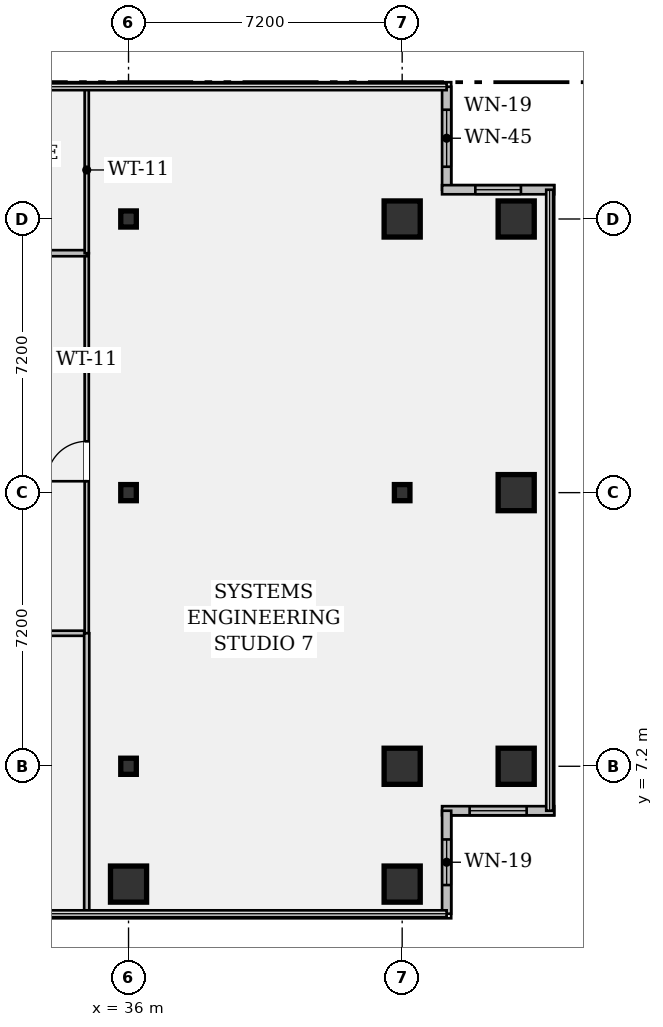
"""IFC4 building model, lengths in metres.
Left out: names, types, materials, properties, quantities, classifications, styles, units other than length and angle.
Written with IfcOpenShell. Run it as: python <this file> out.ifc"""

import sys

from ifc_helpers import new_model, si_unit, direction, frame, frame_2d, origin, origin_2d, place, context, subcontext, project, spatial, rectangle, hollow_rectangle, i_section, extrude, element, fill, save


model = new_model("IFC4")
c1 = context("Model", 3, precision=1e-05, world=origin(), true_north=direction((0.0, 1.0)))
c2 = subcontext(c1, "Body", "Model", "MODEL_VIEW")
j1 = project(units=[si_unit("LENGTHUNIT", "METRE"), si_unit("PLANEANGLEUNIT", "RADIAN")], contexts=[c1])
p1 = place(None, origin())
s1 = spatial("IfcSite", under=j1, at=p1, CompositionType="ELEMENT")
p2 = place(p1, origin())
s2 = spatial("IfcBuilding", under=s1, at=p2, CompositionType="ELEMENT")
p3 = place(p2, frame((0.0, 0.0, 113.75)))
s3 = spatial("IfcBuildingStorey", under=s2, at=p3, CompositionType="ELEMENT", Elevation=113.75)
p4 = place(p3, frame((36.0, 4.1, 0.0), z_axis=(0.0, 0.0, 1.0), x_axis=(1.0, 0.0, 0.0)))
e1 = element("IfcColumn", 1, at=p4, inside=s3, PredefinedType="COLUMN", context=c2, shape_type="SweptSolid", body=[
    extrude(hollow_rectangle(XDim=0.95, YDim=0.95, WallThickness=0.06, at=origin_2d()), origin(), (0.0, 0.0, 1.0), 3.58),
])
for number, where, z_axis, x_axis in (
    (2, (36.0, 7.2, 0.0), (0.0, 0.0, 1.0), (1.0, 0.0, 0.0)),
    (3, (36.0, 14.4, 0.0), (0.0, 0.0, 1.0), (1.0, 0.0, 0.0)),
    (4, (36.0, 21.6, 0.0), (0.0, 0.0, 1.0), (1.0, 0.0, 0.0)),
):
    element("IfcColumn", number, at=place(p3, frame(where, z_axis=z_axis, x_axis=x_axis)), inside=s3, PredefinedType="COLUMN", context=c2, shape_type="SweptSolid", body=[
        extrude(i_section(OverallWidth=0.409, OverallDepth=0.424, WebThickness=0.033, FlangeThickness=0.052, FilletRadius=0.018, at=origin_2d()), origin(), (0.0, 0.0, 1.0), 3.58),
    ])
for number, where, z_axis, x_axis in (
    (5, (43.2, 4.1, 0.0), (0.0, 0.0, 1.0), (1.0, 0.0, 0.0)),
    (6, (43.2, 7.2, 0.0), (0.0, 0.0, 1.0), (1.0, 0.0, 0.0)),
):
    element("IfcColumn", number, at=place(p3, frame(where, z_axis=z_axis, x_axis=x_axis)), inside=s3, PredefinedType="COLUMN", context=c2, shape_type="SweptSolid", body=[
        extrude(hollow_rectangle(XDim=0.95, YDim=0.95, WallThickness=0.06, at=origin_2d()), origin(), (0.0, 0.0, 1.0), 3.58),
    ])
p5 = place(p3, frame((43.2, 14.4, 0.0), z_axis=(0.0, 0.0, 1.0), x_axis=(1.0, 0.0, 0.0)))
e7 = element("IfcColumn", 7, at=p5, inside=s3, PredefinedType="COLUMN", context=c2, shape_type="SweptSolid", body=[
    extrude(i_section(OverallWidth=0.409, OverallDepth=0.424, WebThickness=0.033, FlangeThickness=0.052, FilletRadius=0.018, at=origin_2d()), origin(), (0.0, 0.0, 1.0), 3.58),
])
for number, where, z_axis, x_axis in (
    (8, (43.2, 21.6, 0.0), (0.0, 0.0, 1.0), (1.0, 0.0, 0.0)),
    (9, (46.2, 7.2, 0.0), (0.0, 0.0, 1.0), (1.0, 0.0, 0.0)),
    (10, (46.2, 14.4, 0.0), (0.0, 0.0, 1.0), (1.0, 0.0, 0.0)),
    (11, (46.2, 21.6, 0.0), (0.0, 0.0, 1.0), (1.0, 0.0, 0.0)),
):
    element("IfcColumn", number, at=place(p3, frame(where, z_axis=z_axis, x_axis=x_axis)), inside=s3, PredefinedType="COLUMN", context=c2, shape_type="SweptSolid", body=[
        extrude(hollow_rectangle(XDim=0.95, YDim=0.95, WallThickness=0.06, at=origin_2d()), origin(), (0.0, 0.0, 1.0), 3.58),
    ])
p6 = place(p3, frame((44.37, 25.08, 0.0), z_axis=(0.0, 0.0, 1.0), x_axis=(0.0, -1.0, 0.0)))
e12 = element("IfcWall", 12, at=p6, inside=s3, PredefinedType="STANDARD", context=c2, shape_type="SweptSolid", body=[
    extrude(rectangle(XDim=2.71, YDim=0.24, at=frame_2d((1.355, 0.0))), origin(), (0.0, 0.0, 1.0), 3.58),
])
p7 = place(p6, frame((0.605, 0.0, 0.95)))
e13 = element("IfcOpeningElement", 13, at=p7, cuts=e12, PredefinedType="OPENING", context=c2, shape_type="SweptSolid", body=[
    extrude(rectangle(XDim=1.5, YDim=1.8, at=frame_2d((0.75, 0.9))), frame((0.0, 0.132, 0.0), z_axis=(0.0, -1.0, 0.0), x_axis=(1.0, 0.0, 0.0)), (0.0, 0.0, 1.0), 0.264),
])
p8 = place(p3, frame((44.25, 22.37, 0.0), z_axis=(0.0, 0.0, 1.0), x_axis=(1.0, 0.0, 0.0)))
e14 = element("IfcWall", 14, at=p8, inside=s3, PredefinedType="STANDARD", context=c2, shape_type="SweptSolid", body=[
    extrude(rectangle(XDim=2.95, YDim=0.24, at=frame_2d((1.475, 0.0))), origin(), (0.0, 0.0, 1.0), 3.58),
])
p9 = place(p8, frame((0.875, 0.0, 0.95)))
e15 = element("IfcOpeningElement", 15, at=p9, cuts=e14, PredefinedType="OPENING", context=c2, shape_type="SweptSolid", body=[
    extrude(rectangle(XDim=1.2, YDim=1.8, at=frame_2d((0.6, 0.9))), frame((0.0, 0.132, 0.0), z_axis=(0.0, -1.0, 0.0), x_axis=(1.0, 0.0, 0.0)), (0.0, 0.0, 1.0), 0.264),
])
p10 = place(p3, frame((47.2, 6.03, 0.0), z_axis=(0.0, 0.0, 1.0), x_axis=(-1.0, 0.0, 0.0)))
e16 = element("IfcWall", 16, at=p10, inside=s3, PredefinedType="STANDARD", context=c2, shape_type="SweptSolid", body=[
    extrude(rectangle(XDim=2.95, YDim=0.24, at=frame_2d((1.475, 0.0))), origin(), (0.0, 0.0, 1.0), 3.58),
])
p11 = place(p10, frame((0.725, 0.0, 0.95)))
e17 = element("IfcOpeningElement", 17, at=p11, cuts=e16, PredefinedType="OPENING", context=c2, shape_type="SweptSolid", body=[
    extrude(rectangle(XDim=1.5, YDim=1.8, at=frame_2d((0.75, 0.9))), frame((0.0, 0.132, 0.0), z_axis=(0.0, -1.0, 0.0), x_axis=(1.0, 0.0, 0.0)), (0.0, 0.0, 1.0), 0.264),
])
p12 = place(p3, frame((44.37, 6.03, 0.0), z_axis=(0.0, 0.0, 1.0), x_axis=(0.0, -1.0, 0.0)))
e18 = element("IfcWall", 18, at=p12, inside=s3, PredefinedType="STANDARD", context=c2, shape_type="SweptSolid", body=[
    extrude(rectangle(XDim=2.71, YDim=0.24, at=frame_2d((1.355, 0.0))), origin(), (0.0, 0.0, 1.0), 3.58),
])
p13 = place(p12, frame((0.755, 0.0, 0.95)))
e19 = element("IfcOpeningElement", 19, at=p13, cuts=e18, PredefinedType="OPENING", context=c2, shape_type="SweptSolid", body=[
    extrude(rectangle(XDim=1.2, YDim=1.8, at=frame_2d((0.6, 0.9))), frame((0.0, 0.132, 0.0), z_axis=(0.0, -1.0, 0.0), x_axis=(1.0, 0.0, 0.0)), (0.0, 0.0, 1.0), 0.264),
])
p14 = place(p3, frame((17.35, 10.7, 0.0), z_axis=(0.0, 0.0, 1.0), x_axis=(1.0, 0.0, 0.0)))
e20 = element("IfcWall", 20, at=p14, inside=s3, PredefinedType="PARTITIONING", context=c2, shape_type="SweptSolid", body=[
    extrude(rectangle(XDim=17.55, YDim=0.135, at=frame_2d((8.775, 0.0))), origin(), (0.0, 0.0, 1.0), 2.869),
])
p15 = place(p14, frame((2.82, 0.0, 0.0)))
e21 = element("IfcOpeningElement", 21, at=p15, cuts=e20, PredefinedType="OPENING", context=c2, shape_type="SweptSolid", body=[
    extrude(rectangle(XDim=0.98, YDim=2.15, at=frame_2d((0.49, 1.075))), frame((0.0, 0.08, 0.0), z_axis=(0.0, -1.0, 0.0), x_axis=(1.0, 0.0, 0.0)), (0.0, 0.0, 1.0), 0.159),
])
p16 = place(p14, frame((9.45, 0.0, 0.0)))
e22 = element("IfcOpeningElement", 22, at=p16, cuts=e20, PredefinedType="OPENING", context=c2, shape_type="SweptSolid", body=[
    extrude(rectangle(XDim=0.98, YDim=2.15, at=frame_2d((0.49, 1.075))), frame((0.0, 0.08, 0.0), z_axis=(0.0, -1.0, 0.0), x_axis=(1.0, 0.0, 0.0)), (0.0, 0.0, 1.0), 0.159),
])
p17 = place(p14, frame((14.9, 0.0, 0.0)))
e23 = element("IfcOpeningElement", 23, at=p17, cuts=e20, PredefinedType="OPENING", context=c2, shape_type="SweptSolid", body=[
    extrude(rectangle(XDim=0.98, YDim=2.15, at=frame_2d((0.49, 1.075))), frame((0.0, 0.08, 0.0), z_axis=(0.0, -1.0, 0.0), x_axis=(1.0, 0.0, 0.0)), (0.0, 0.0, 1.0), 0.159),
])
p18 = place(p3, frame((34.9, 10.7, 0.0), z_axis=(0.0, 0.0, 1.0), x_axis=(0.0, 1.0, 0.0)))
e24 = element("IfcWall", 24, at=p18, inside=s3, PredefinedType="PARTITIONING", context=c2, shape_type="SweptSolid", body=[
    extrude(rectangle(XDim=10.0, YDim=0.11, at=frame_2d((5.0, 0.0))), origin(), (0.0, 0.0, 1.0), 2.869),
])
p19 = place(p18, frame((4.0, 0.0, 0.0)))
e25 = element("IfcOpeningElement", 25, at=p19, cuts=e24, PredefinedType="OPENING", context=c2, shape_type="SweptSolid", body=[
    extrude(rectangle(XDim=1.05, YDim=2.15, at=frame_2d((0.525, 1.075))), frame((0.0, 0.067, 0.0), z_axis=(0.0, -1.0, 0.0), x_axis=(1.0, 0.0, 0.0)), (0.0, 0.0, 1.0), 0.134),
])
p20 = place(p3, frame((17.35, 20.7, 0.0), z_axis=(0.0, 0.0, 1.0), x_axis=(1.0, 0.0, 0.0)))
e26 = element("IfcWall", 26, at=p20, inside=s3, PredefinedType="PARTITIONING", context=c2, shape_type="SweptSolid", body=[
    extrude(rectangle(XDim=17.55, YDim=0.16, at=frame_2d((8.775, 0.0))), origin(), (0.0, 0.0, 1.0), 2.869),
])
p21 = place(p20, frame((0.85, 0.0, 0.0)))
e27 = element("IfcOpeningElement", 27, at=p21, cuts=e26, PredefinedType="OPENING", context=c2, shape_type="SweptSolid", body=[
    extrude(rectangle(XDim=0.85, YDim=2.15, at=frame_2d((0.425, 1.075))), frame((0.0, 0.092, 0.0), z_axis=(0.0, -1.0, 0.0), x_axis=(1.0, 0.0, 0.0)), (0.0, 0.0, 1.0), 0.184),
])
p22 = place(p20, frame((4.75, 0.0, 0.0)))
e28 = element("IfcOpeningElement", 28, at=p22, cuts=e26, PredefinedType="OPENING", context=c2, shape_type="SweptSolid", body=[
    extrude(rectangle(XDim=0.85, YDim=2.15, at=frame_2d((0.425, 1.075))), frame((0.0, 0.092, 0.0), z_axis=(0.0, -1.0, 0.0), x_axis=(1.0, 0.0, 0.0)), (0.0, 0.0, 1.0), 0.184),
])
p23 = place(p20, frame((6.81, 0.0, 0.0)))
e29 = element("IfcOpeningElement", 29, at=p23, cuts=e26, PredefinedType="OPENING", context=c2, shape_type="SweptSolid", body=[
    extrude(rectangle(XDim=0.85, YDim=2.15, at=frame_2d((0.425, 1.075))), frame((0.0, 0.092, 0.0), z_axis=(0.0, -1.0, 0.0), x_axis=(1.0, 0.0, 0.0)), (0.0, 0.0, 1.0), 0.184),
])
p24 = place(p20, frame((9.21, 0.0, 0.0)))
e30 = element("IfcOpeningElement", 30, at=p24, cuts=e26, PredefinedType="OPENING", context=c2, shape_type="SweptSolid", body=[
    extrude(rectangle(XDim=0.98, YDim=2.15, at=frame_2d((0.49, 1.075))), frame((0.0, 0.092, 0.0), z_axis=(0.0, -1.0, 0.0), x_axis=(1.0, 0.0, 0.0)), (0.0, 0.0, 1.0), 0.184),
])
p25 = place(p3, frame((34.9, 3.32, 0.0), z_axis=(0.0, 0.0, 1.0), x_axis=(0.0, 1.0, 0.0)))
e31 = element("IfcWall", 31, at=p25, inside=s3, PredefinedType="PARTITIONING", context=c2, shape_type="SweptSolid", body=[
    extrude(rectangle(XDim=7.38, YDim=0.135, at=frame_2d((3.69, 0.0))), origin(), (0.0, 0.0, 1.0), 2.869),
])
p26 = place(p3, frame((34.9, 20.7, 0.0), z_axis=(0.0, 0.0, 1.0), x_axis=(0.0, 1.0, 0.0)))
e32 = element("IfcWall", 32, at=p26, inside=s3, PredefinedType="PARTITIONING", context=c2, shape_type="SweptSolid", body=[
    extrude(rectangle(XDim=4.38, YDim=0.11, at=frame_2d((2.19, 0.0))), origin(), (0.0, 0.0, 1.0), 2.869),
])
p27 = place(p7, origin())
e33 = element("IfcWindow", 33, at=p27, inside=s3, PartitioningType="SINGLE_PANEL", PredefinedType="WINDOW", context=c2, shape_type="SweptSolid", body=[
    extrude(rectangle(XDim=1.5, YDim=1.8, at=frame_2d((0.75, 0.9))), frame((0.0, 0.03, 0.0), z_axis=(0.0, -1.0, 0.0), x_axis=(1.0, 0.0, 0.0)), (0.0, 0.0, 1.0), 0.06),
])
fill(e13, e33)
p28 = place(p9, origin())
e34 = element("IfcWindow", 34, at=p28, inside=s3, PartitioningType="SINGLE_PANEL", PredefinedType="WINDOW", context=c2, shape_type="SweptSolid", body=[
    extrude(rectangle(XDim=1.2, YDim=1.8, at=frame_2d((0.6, 0.9))), frame((0.0, 0.03, 0.0), z_axis=(0.0, -1.0, 0.0), x_axis=(1.0, 0.0, 0.0)), (0.0, 0.0, 1.0), 0.06),
])
fill(e15, e34)
p29 = place(p11, origin())
e35 = element("IfcWindow", 35, at=p29, inside=s3, PartitioningType="SINGLE_PANEL", PredefinedType="WINDOW", context=c2, shape_type="SweptSolid", body=[
    extrude(rectangle(XDim=1.5, YDim=1.8, at=frame_2d((0.75, 0.9))), frame((0.0, 0.03, 0.0), z_axis=(0.0, -1.0, 0.0), x_axis=(1.0, 0.0, 0.0)), (0.0, 0.0, 1.0), 0.06),
])
fill(e17, e35)
p30 = place(p13, origin())
e36 = element("IfcWindow", 36, at=p30, inside=s3, PartitioningType="SINGLE_PANEL", PredefinedType="WINDOW", context=c2, shape_type="SweptSolid", body=[
    extrude(rectangle(XDim=1.2, YDim=1.8, at=frame_2d((0.6, 0.9))), frame((0.0, 0.03, 0.0), z_axis=(0.0, -1.0, 0.0), x_axis=(1.0, 0.0, 0.0)), (0.0, 0.0, 1.0), 0.06),
])
fill(e19, e36)
p31 = place(p19, origin())
e37 = element("IfcDoor", 37, at=p31, inside=s3, OperationType="SINGLE_SWING_LEFT", PredefinedType="DOOR", context=c2, shape_type="SweptSolid", body=[
    extrude(rectangle(XDim=1.05, YDim=2.15, at=frame_2d((0.525, 1.075))), frame((0.0, 0.025, 0.0), z_axis=(0.0, -1.0, 0.0), x_axis=(1.0, 0.0, 0.0)), (0.0, 0.0, 1.0), 0.05),
])
fill(e25, e37)
save(model, sys.argv[1])
